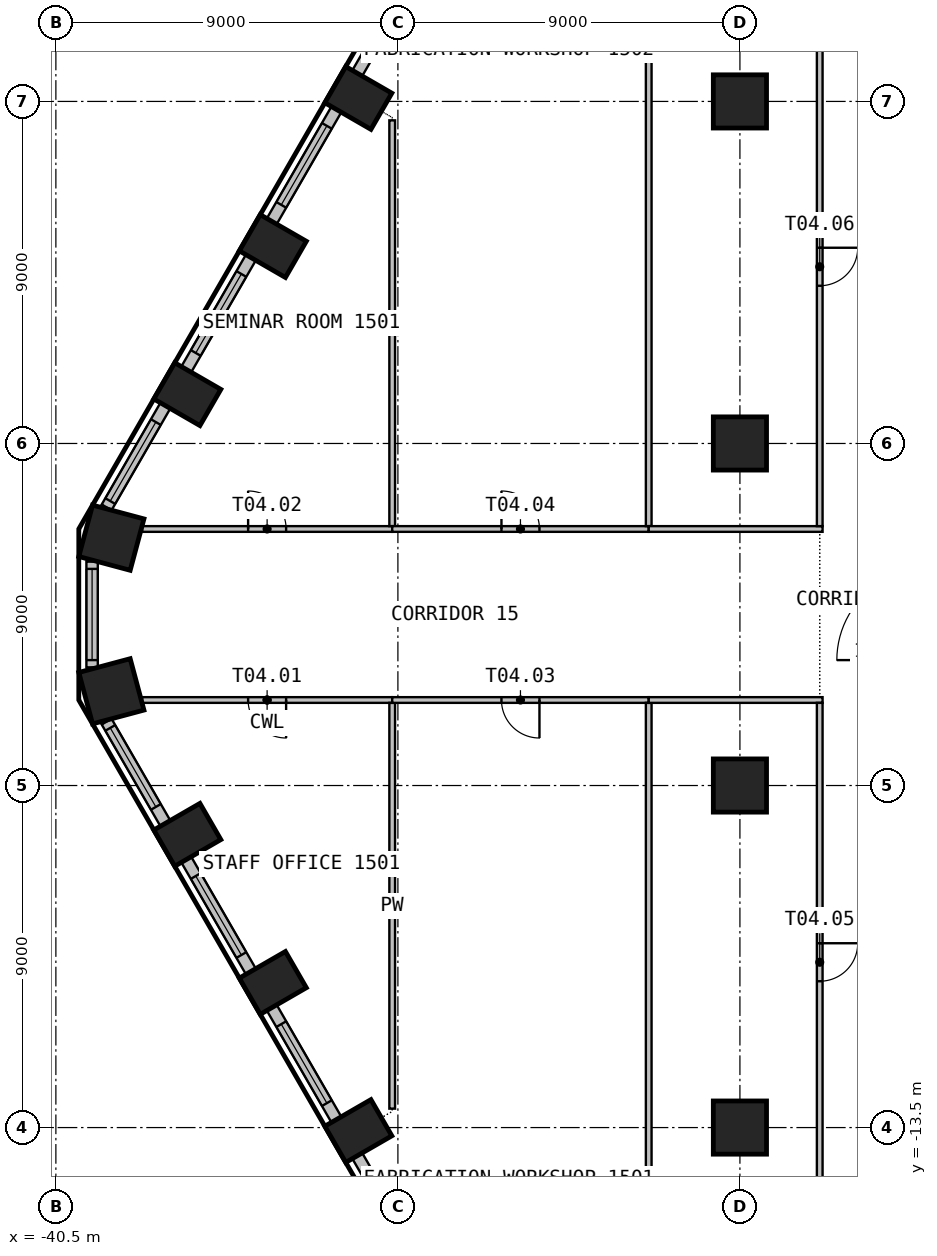
"""IFC4 building model, lengths in metres.
Left out: names, types, materials, properties, quantities, classifications, styles, units other than length and angle.
Written with IfcOpenShell. Run it as: python <this file> out.ifc"""

import sys

from ifc_helpers import new_model, si_unit, direction, frame, frame_2d, origin, origin_2d, place, context, subcontext, project, spatial, rectangle, circle, extrude, element, fill, save


model = new_model("IFC4")
c1 = context("Model", 3, precision=1e-05, world=origin(), true_north=direction((0.0, 1.0)))
c2 = subcontext(c1, "Body", "Model", "MODEL_VIEW")
j1 = project(units=[si_unit("LENGTHUNIT", "METRE"), si_unit("PLANEANGLEUNIT", "RADIAN")], contexts=[c1])
p1 = place(None, origin())
s1 = spatial("IfcSite", under=j1, at=p1, CompositionType="ELEMENT")
p2 = place(p1, origin())
s2 = spatial("IfcBuilding", under=s1, at=p2, CompositionType="ELEMENT")
p3 = place(p2, frame((0.0, 0.0, 65.1)))
s3 = spatial("IfcBuildingStorey", under=s2, at=p3, CompositionType="ELEMENT", Elevation=65.1)
for number, where, z_axis, x_axis in (
    (1, (-32.541, 13.591, 0.0), (0.0, 0.0, 1.0), (-0.5, -0.866, 0.0)),
    (2, (-34.791, 9.694, 0.0), (0.0, 0.0, 1.0), (-0.5, -0.866, 0.0)),
    (3, (-37.041, 5.797, 0.0), (0.0, 0.0, 1.0), (-0.5, -0.866, 0.0)),
):
    element("IfcColumn", number, at=place(p3, frame(where, z_axis=z_axis, x_axis=x_axis)), inside=s3, PredefinedType="COLUMN", context=c2, shape_type="SweptSolid", body=[
        extrude(rectangle(XDim=1.1, YDim=1.4, at=origin_2d()), origin(), (0.0, 0.0, 1.0), 3.525),
    ])
for number, where, z_axis, x_axis in (
    (4, (-39.04, 2.02, 0.0), (0.0, 0.0, 1.0), (-0.259, -0.966, 0.0)),
    (5, (-39.04, -2.02, 0.0), (0.0, 0.0, 1.0), (0.259, -0.966, 0.0)),
):
    element("IfcColumn", number, at=place(p3, frame(where, z_axis=z_axis, x_axis=x_axis)), inside=s3, PredefinedType="COLUMN", context=c2, shape_type="SweptSolid", body=[
        extrude(rectangle(XDim=1.4, YDim=1.4, at=origin_2d()), origin(), (0.0, 0.0, 1.0), 3.525),
    ])
for number, where, z_axis, x_axis in (
    (6, (-37.041, -5.797, 0.0), (0.0, 0.0, 1.0), (0.5, -0.866, 0.0)),
    (7, (-34.791, -9.694, 0.0), (0.0, 0.0, 1.0), (0.5, -0.866, 0.0)),
    (8, (-32.541, -13.591, 0.0), (0.0, 0.0, 1.0), (0.5, -0.866, 0.0)),
):
    element("IfcColumn", number, at=place(p3, frame(where, z_axis=z_axis, x_axis=x_axis)), inside=s3, PredefinedType="COLUMN", context=c2, shape_type="SweptSolid", body=[
        extrude(rectangle(XDim=1.1, YDim=1.4, at=origin_2d()), origin(), (0.0, 0.0, 1.0), 3.525),
    ])
for number, where, z_axis, x_axis in (
    (9, (-22.5, -13.5, 0.0), (0.0, 0.0, 1.0), (1.0, 0.0, 0.0)),
    (10, (-22.5, -4.5, 0.0), (0.0, 0.0, 1.0), (1.0, 0.0, 0.0)),
    (11, (-22.5, 4.5, 0.0), (0.0, 0.0, 1.0), (1.0, 0.0, 0.0)),
    (12, (-22.5, 13.5, 0.0), (0.0, 0.0, 1.0), (1.0, 0.0, 0.0)),
):
    element("IfcColumn", number, at=place(p3, frame(where, z_axis=z_axis, x_axis=x_axis)), inside=s3, PredefinedType="COLUMN", context=c2, shape_type="SweptSolid", body=[
        extrude(circle(Radius=0.7, at=origin_2d()), origin(), (0.0, 0.0, 1.0), 3.525),
    ])
p4 = place(p3, frame((-30.869, 17.187, 0.0), z_axis=(0.0, 0.0, 1.0), x_axis=(-0.499993955907, -0.866028893315, 0.0)))
e13 = element("IfcWall", 13, at=p4, inside=s3, PredefinedType="SOLIDWALL", context=c2, shape_type="SweptSolid", body=[
    extrude(rectangle(XDim=3.399, YDim=0.3, at=frame_2d((1.699, 0.0))), origin(), (0.0, 0.0, 1.0), 3.525),
])
p5 = place(p4, frame((0.5, 0.0, 0.9)))
e14 = element("IfcOpeningElement", 14, at=p5, cuts=e13, PredefinedType="OPENING", context=c2, shape_type="SweptSolid", body=[
    extrude(rectangle(XDim=2.4, YDim=2.1, at=frame_2d((1.2, 1.05))), frame((0.0, 0.16, 0.0), z_axis=(0.0, -1.0, 0.0), x_axis=(1.0, 0.0, 0.0)), (0.0, 0.0, 1.0), 0.32),
])
p6 = place(p3, frame((-33.119, 13.29, 0.0), z_axis=(0.0, 0.0, 1.0), x_axis=(-0.499993955907, -0.866028893315, 0.0)))
e15 = element("IfcWall", 15, at=p6, inside=s3, PredefinedType="SOLIDWALL", context=c2, shape_type="SweptSolid", body=[
    extrude(rectangle(XDim=3.399, YDim=0.3, at=frame_2d((1.699, 0.0))), origin(), (0.0, 0.0, 1.0), 3.525),
])
p7 = place(p6, frame((0.5, 0.0, 0.9)))
e16 = element("IfcOpeningElement", 16, at=p7, cuts=e15, PredefinedType="OPENING", context=c2, shape_type="SweptSolid", body=[
    extrude(rectangle(XDim=2.4, YDim=2.1, at=frame_2d((1.2, 1.05))), frame((0.0, 0.16, 0.0), z_axis=(0.0, -1.0, 0.0), x_axis=(1.0, 0.0, 0.0)), (0.0, 0.0, 1.0), 0.32),
])
p8 = place(p3, frame((-35.369, 9.393, 0.0), z_axis=(0.0, 0.0, 1.0), x_axis=(-0.499993955907, -0.866028893315, 0.0)))
e17 = element("IfcWall", 17, at=p8, inside=s3, PredefinedType="SOLIDWALL", context=c2, shape_type="SweptSolid", body=[
    extrude(rectangle(XDim=3.399, YDim=0.3, at=frame_2d((1.699, 0.0))), origin(), (0.0, 0.0, 1.0), 3.525),
])
p9 = place(p8, frame((0.5, 0.0, 0.9)))
e18 = element("IfcOpeningElement", 18, at=p9, cuts=e17, PredefinedType="OPENING", context=c2, shape_type="SweptSolid", body=[
    extrude(rectangle(XDim=2.4, YDim=2.1, at=frame_2d((1.2, 1.05))), frame((0.0, 0.16, 0.0), z_axis=(0.0, -1.0, 0.0), x_axis=(1.0, 0.0, 0.0)), (0.0, 0.0, 1.0), 0.32),
])
p10 = place(p3, frame((-37.619, 5.495, 0.0), z_axis=(0.0, 0.0, 1.0), x_axis=(-0.49997090907, -0.866042198789, 0.0)))
e19 = element("IfcWall", 19, at=p10, inside=s3, PredefinedType="SOLIDWALL", context=c2, shape_type="SweptSolid", body=[
    extrude(rectangle(XDim=3.091, YDim=0.3, at=frame_2d((1.545, 0.0))), origin(), (0.0, 0.0, 1.0), 3.525),
])
p11 = place(p10, frame((0.5, 0.0, 0.9)))
e20 = element("IfcOpeningElement", 20, at=p11, cuts=e19, PredefinedType="OPENING", context=c2, shape_type="SweptSolid", body=[
    extrude(rectangle(XDim=2.4, YDim=2.1, at=frame_2d((1.2, 1.05))), frame((0.0, 0.16, 0.0), z_axis=(0.0, -1.0, 0.0), x_axis=(1.0, 0.0, 0.0)), (0.0, 0.0, 1.0), 0.32),
])
p12 = place(p3, frame((-39.547, 1.391, 0.0), z_axis=(0.0, 0.0, 1.0), x_axis=(0.0, -1.0, 0.0)))
e21 = element("IfcWall", 21, at=p12, inside=s3, PredefinedType="SOLIDWALL", context=c2, shape_type="SweptSolid", body=[
    extrude(rectangle(XDim=2.782, YDim=0.3, at=frame_2d((1.391, 0.0))), origin(), (0.0, 0.0, 1.0), 3.525),
])
p13 = place(p12, frame((0.191, 0.0, 0.9)))
e22 = element("IfcOpeningElement", 22, at=p13, cuts=e21, PredefinedType="OPENING", context=c2, shape_type="SweptSolid", body=[
    extrude(rectangle(XDim=2.4, YDim=2.1, at=frame_2d((1.2, 1.05))), frame((0.0, 0.16, 0.0), z_axis=(0.0, -1.0, 0.0), x_axis=(1.0, 0.0, 0.0)), (0.0, 0.0, 1.0), 0.32),
])
p14 = place(p3, frame((-39.165, -2.819, 0.0), z_axis=(0.0, 0.0, 1.0), x_axis=(0.49997090907, -0.866042198789, 0.0)))
e23 = element("IfcWall", 23, at=p14, inside=s3, PredefinedType="SOLIDWALL", context=c2, shape_type="SweptSolid", body=[
    extrude(rectangle(XDim=3.091, YDim=0.3, at=frame_2d((1.545, 0.0))), origin(), (0.0, 0.0, 1.0), 3.525),
])
p15 = place(p14, frame((0.191, 0.0, 0.9)))
e24 = element("IfcOpeningElement", 24, at=p15, cuts=e23, PredefinedType="OPENING", context=c2, shape_type="SweptSolid", body=[
    extrude(rectangle(XDim=2.4, YDim=2.1, at=frame_2d((1.2, 1.05))), frame((0.0, 0.16, 0.0), z_axis=(0.0, -1.0, 0.0), x_axis=(1.0, 0.0, 0.0)), (0.0, 0.0, 1.0), 0.32),
])
p16 = place(p3, frame((-37.069, -6.449, 0.0), z_axis=(0.0, 0.0, 1.0), x_axis=(0.499993955907, -0.866028893315, 0.0)))
e25 = element("IfcWall", 25, at=p16, inside=s3, PredefinedType="SOLIDWALL", context=c2, shape_type="SweptSolid", body=[
    extrude(rectangle(XDim=3.399, YDim=0.3, at=frame_2d((1.699, 0.0))), origin(), (0.0, 0.0, 1.0), 3.525),
])
p17 = place(p16, frame((0.5, 0.0, 0.9)))
e26 = element("IfcOpeningElement", 26, at=p17, cuts=e25, PredefinedType="OPENING", context=c2, shape_type="SweptSolid", body=[
    extrude(rectangle(XDim=2.4, YDim=2.1, at=frame_2d((1.2, 1.05))), frame((0.0, 0.16, 0.0), z_axis=(0.0, -1.0, 0.0), x_axis=(1.0, 0.0, 0.0)), (0.0, 0.0, 1.0), 0.32),
])
p18 = place(p3, frame((-34.819, -10.346, 0.0), z_axis=(0.0, 0.0, 1.0), x_axis=(0.499993955907, -0.866028893315, 0.0)))
e27 = element("IfcWall", 27, at=p18, inside=s3, PredefinedType="SOLIDWALL", context=c2, shape_type="SweptSolid", body=[
    extrude(rectangle(XDim=3.399, YDim=0.3, at=frame_2d((1.699, 0.0))), origin(), (0.0, 0.0, 1.0), 3.525),
])
p19 = place(p18, frame((0.5, 0.0, 0.9)))
e28 = element("IfcOpeningElement", 28, at=p19, cuts=e27, PredefinedType="OPENING", context=c2, shape_type="SweptSolid", body=[
    extrude(rectangle(XDim=2.4, YDim=2.1, at=frame_2d((1.2, 1.05))), frame((0.0, 0.16, 0.0), z_axis=(0.0, -1.0, 0.0), x_axis=(1.0, 0.0, 0.0)), (0.0, 0.0, 1.0), 0.32),
])
p20 = place(p3, frame((-32.569, -14.243, 0.0), z_axis=(0.0, 0.0, 1.0), x_axis=(0.499993955907, -0.866028893315, 0.0)))
e29 = element("IfcWall", 29, at=p20, inside=s3, PredefinedType="SOLIDWALL", context=c2, shape_type="SweptSolid", body=[
    extrude(rectangle(XDim=3.399, YDim=0.3, at=frame_2d((1.699, 0.0))), origin(), (0.0, 0.0, 1.0), 3.525),
])
p21 = place(p20, frame((0.5, 0.0, 0.9)))
e30 = element("IfcOpeningElement", 30, at=p21, cuts=e29, PredefinedType="OPENING", context=c2, shape_type="SweptSolid", body=[
    extrude(rectangle(XDim=2.4, YDim=2.1, at=frame_2d((1.2, 1.05))), frame((0.0, 0.16, 0.0), z_axis=(0.0, -1.0, 0.0), x_axis=(1.0, 0.0, 0.0)), (0.0, 0.0, 1.0), 0.32),
])
p22 = place(p3, frame((-31.65, -2.25, 0.0), z_axis=(0.0, 0.0, 1.0), x_axis=(-1.0, 0.0, 0.0)))
e31 = element("IfcWall", 31, at=p22, inside=s3, PredefinedType="PARTITIONING", context=c2, shape_type="SweptSolid", body=[
    extrude(rectangle(XDim=6.583, YDim=0.15, at=frame_2d((3.292, 0.0))), origin(), (0.0, 0.0, 1.0), 3.525),
])
p23 = place(p22, frame((2.792, 0.0, 0.0)))
e32 = element("IfcOpeningElement", 32, at=p23, cuts=e31, PredefinedType="OPENING", context=c2, shape_type="SweptSolid", body=[
    extrude(rectangle(XDim=1.0, YDim=2.1, at=frame_2d((0.5, 1.05))), frame((0.0, 0.085, 0.0), z_axis=(0.0, -1.0, 0.0), x_axis=(1.0, 0.0, 0.0)), (0.0, 0.0, 1.0), 0.17),
])
p24 = place(p3, frame((-38.233, 2.25, 0.0), z_axis=(0.0, 0.0, 1.0), x_axis=(1.0, 0.0, 0.0)))
e33 = element("IfcWall", 33, at=p24, inside=s3, PredefinedType="PARTITIONING", context=c2, shape_type="SweptSolid", body=[
    extrude(rectangle(XDim=6.583, YDim=0.15, at=frame_2d((3.292, 0.0))), origin(), (0.0, 0.0, 1.0), 3.525),
])
p25 = place(p24, frame((2.792, 0.0, 0.0)))
e34 = element("IfcOpeningElement", 34, at=p25, cuts=e33, PredefinedType="OPENING", context=c2, shape_type="SweptSolid", body=[
    extrude(rectangle(XDim=1.0, YDim=2.1, at=frame_2d((0.5, 1.05))), frame((0.0, 0.085, 0.0), z_axis=(0.0, -1.0, 0.0), x_axis=(1.0, 0.0, 0.0)), (0.0, 0.0, 1.0), 0.17),
])
p26 = place(p3, frame((-31.65, -2.325, 0.0), z_axis=(0.0, 0.0, 1.0), x_axis=(0.0, -1.0, 0.0)))
e35 = element("IfcWall", 35, at=p26, inside=s3, PredefinedType="PARTITIONING", context=c2, shape_type="SweptSolid", body=[
    extrude(rectangle(XDim=10.677, YDim=0.15, at=frame_2d((5.338, 0.0))), origin(), (0.0, 0.0, 1.0), 3.525),
])
p27 = place(p3, frame((-24.9, -2.25, 0.0), z_axis=(0.0, 0.0, 1.0), x_axis=(-1.0, 0.0, 0.0)))
e36 = element("IfcWall", 36, at=p27, inside=s3, PredefinedType="PARTITIONING", context=c2, shape_type="SweptSolid", body=[
    extrude(rectangle(XDim=6.75, YDim=0.15, at=frame_2d((3.375, 0.0))), origin(), (0.0, 0.0, 1.0), 3.525),
])
p28 = place(p27, frame((2.875, 0.0, 0.0)))
e37 = element("IfcOpeningElement", 37, at=p28, cuts=e36, PredefinedType="OPENING", context=c2, shape_type="SweptSolid", body=[
    extrude(rectangle(XDim=1.0, YDim=2.1, at=frame_2d((0.5, 1.05))), frame((0.0, 0.085, 0.0), z_axis=(0.0, -1.0, 0.0), x_axis=(1.0, 0.0, 0.0)), (0.0, 0.0, 1.0), 0.17),
])
p29 = place(p3, frame((-31.65, 13.002, 0.0), z_axis=(0.0, 0.0, 1.0), x_axis=(0.0, -1.0, 0.0)))
e38 = element("IfcWall", 38, at=p29, inside=s3, PredefinedType="PARTITIONING", context=c2, shape_type="SweptSolid", body=[
    extrude(rectangle(XDim=10.677, YDim=0.15, at=frame_2d((5.338, 0.0))), origin(), (0.0, 0.0, 1.0), 3.525),
])
p30 = place(p3, frame((-31.65, 2.25, 0.0), z_axis=(0.0, 0.0, 1.0), x_axis=(1.0, 0.0, 0.0)))
e39 = element("IfcWall", 39, at=p30, inside=s3, PredefinedType="PARTITIONING", context=c2, shape_type="SweptSolid", body=[
    extrude(rectangle(XDim=6.75, YDim=0.15, at=frame_2d((3.375, 0.0))), origin(), (0.0, 0.0, 1.0), 3.525),
])
p31 = place(p30, frame((2.875, 0.0, 0.0)))
e40 = element("IfcOpeningElement", 40, at=p31, cuts=e39, PredefinedType="OPENING", context=c2, shape_type="SweptSolid", body=[
    extrude(rectangle(XDim=1.0, YDim=2.1, at=frame_2d((0.5, 1.05))), frame((0.0, 0.085, 0.0), z_axis=(0.0, -1.0, 0.0), x_axis=(1.0, 0.0, 0.0)), (0.0, 0.0, 1.0), 0.17),
])
p32 = place(p3, frame((-24.9, -2.325, 0.0), z_axis=(0.0, 0.0, 1.0), x_axis=(0.0, -1.0, 0.0)))
e41 = element("IfcWall", 41, at=p32, inside=s3, PredefinedType="PARTITIONING", context=c2, shape_type="SweptSolid", body=[
    extrude(rectangle(XDim=22.368, YDim=0.15, at=frame_2d((11.184, 0.0))), origin(), (0.0, 0.0, 1.0), 3.525),
])
p33 = place(p3, frame((-20.325, -2.25, 0.0), z_axis=(0.0, 0.0, 1.0), x_axis=(-1.0, 0.0, 0.0)))
e42 = element("IfcWall", 42, at=p33, inside=s3, PredefinedType="PARTITIONING", context=c2, shape_type="SweptSolid", body=[
    extrude(rectangle(XDim=4.575, YDim=0.15, at=frame_2d((2.288, 0.0))), origin(), (0.0, 0.0, 1.0), 3.525),
])
p34 = place(p3, frame((-24.9, 24.693, 0.0), z_axis=(0.0, 0.0, 1.0), x_axis=(0.0, -1.0, 0.0)))
e43 = element("IfcWall", 43, at=p34, inside=s3, PredefinedType="PARTITIONING", context=c2, shape_type="SweptSolid", body=[
    extrude(rectangle(XDim=22.368, YDim=0.15, at=frame_2d((11.184, 0.0))), origin(), (0.0, 0.0, 1.0), 3.525),
])
p35 = place(p3, frame((-24.9, 2.25, 0.0), z_axis=(0.0, 0.0, 1.0), x_axis=(1.0, 0.0, 0.0)))
e44 = element("IfcWall", 44, at=p35, inside=s3, PredefinedType="PARTITIONING", context=c2, shape_type="SweptSolid", body=[
    extrude(rectangle(XDim=4.575, YDim=0.15, at=frame_2d((2.288, 0.0))), origin(), (0.0, 0.0, 1.0), 3.525),
])
p36 = place(p3, frame((-20.4, -2.325, 0.0), z_axis=(0.0, 0.0, 1.0), x_axis=(0.0, -1.0, 0.0)))
e45 = element("IfcWall", 45, at=p36, inside=s3, PredefinedType="PARTITIONING", context=c2, shape_type="SweptSolid", body=[
    extrude(rectangle(XDim=13.65, YDim=0.15, at=frame_2d((6.825, 0.0))), origin(), (0.0, 0.0, 1.0), 3.525),
])
p37 = place(p36, frame((6.325, 0.0, 0.0)))
e46 = element("IfcOpeningElement", 46, at=p37, cuts=e45, PredefinedType="OPENING", context=c2, shape_type="SweptSolid", body=[
    extrude(rectangle(XDim=1.0, YDim=2.1, at=frame_2d((0.5, 1.05))), frame((0.0, 0.085, 0.0), z_axis=(0.0, -1.0, 0.0), x_axis=(1.0, 0.0, 0.0)), (0.0, 0.0, 1.0), 0.17),
])
p38 = place(p3, frame((-20.4, 15.975, 0.0), z_axis=(0.0, 0.0, 1.0), x_axis=(0.0, -1.0, 0.0)))
e47 = element("IfcWall", 47, at=p38, inside=s3, PredefinedType="PARTITIONING", context=c2, shape_type="SweptSolid", body=[
    extrude(rectangle(XDim=13.65, YDim=0.15, at=frame_2d((6.825, 0.0))), origin(), (0.0, 0.0, 1.0), 3.525),
])
p39 = place(p38, frame((6.325, 0.0, 0.0)))
e48 = element("IfcOpeningElement", 48, at=p39, cuts=e47, PredefinedType="OPENING", context=c2, shape_type="SweptSolid", body=[
    extrude(rectangle(XDim=1.0, YDim=2.1, at=frame_2d((0.5, 1.05))), frame((0.0, 0.085, 0.0), z_axis=(0.0, -1.0, 0.0), x_axis=(1.0, 0.0, 0.0)), (0.0, 0.0, 1.0), 0.17),
])
p40 = place(p5, origin())
e49 = element("IfcWindow", 49, at=p40, inside=s3, PartitioningType="SINGLE_PANEL", PredefinedType="WINDOW", context=c2, shape_type="SweptSolid", body=[
    extrude(rectangle(XDim=2.4, YDim=2.1, at=frame_2d((1.2, 1.05))), frame((0.0, 0.03, 0.0), z_axis=(0.0, -1.0, 0.0), x_axis=(1.0, 0.0, 0.0)), (0.0, 0.0, 1.0), 0.06),
])
fill(e14, e49)
p41 = place(p7, origin())
e50 = element("IfcWindow", 50, at=p41, inside=s3, PartitioningType="SINGLE_PANEL", PredefinedType="WINDOW", context=c2, shape_type="SweptSolid", body=[
    extrude(rectangle(XDim=2.4, YDim=2.1, at=frame_2d((1.2, 1.05))), frame((0.0, 0.03, 0.0), z_axis=(0.0, -1.0, 0.0), x_axis=(1.0, 0.0, 0.0)), (0.0, 0.0, 1.0), 0.06),
])
fill(e16, e50)
p42 = place(p9, origin())
e51 = element("IfcWindow", 51, at=p42, inside=s3, PartitioningType="SINGLE_PANEL", PredefinedType="WINDOW", context=c2, shape_type="SweptSolid", body=[
    extrude(rectangle(XDim=2.4, YDim=2.1, at=frame_2d((1.2, 1.05))), frame((0.0, 0.03, 0.0), z_axis=(0.0, -1.0, 0.0), x_axis=(1.0, 0.0, 0.0)), (0.0, 0.0, 1.0), 0.06),
])
fill(e18, e51)
p43 = place(p11, origin())
e52 = element("IfcWindow", 52, at=p43, inside=s3, PartitioningType="SINGLE_PANEL", PredefinedType="WINDOW", context=c2, shape_type="SweptSolid", body=[
    extrude(rectangle(XDim=2.4, YDim=2.1, at=frame_2d((1.2, 1.05))), frame((0.0, 0.03, 0.0), z_axis=(0.0, -1.0, 0.0), x_axis=(1.0, 0.0, 0.0)), (0.0, 0.0, 1.0), 0.06),
])
fill(e20, e52)
p44 = place(p13, origin())
e53 = element("IfcWindow", 53, at=p44, inside=s3, PartitioningType="SINGLE_PANEL", PredefinedType="WINDOW", context=c2, shape_type="SweptSolid", body=[
    extrude(rectangle(XDim=2.4, YDim=2.1, at=frame_2d((1.2, 1.05))), frame((0.0, 0.03, 0.0), z_axis=(0.0, -1.0, 0.0), x_axis=(1.0, 0.0, 0.0)), (0.0, 0.0, 1.0), 0.06),
])
fill(e22, e53)
p45 = place(p15, origin())
e54 = element("IfcWindow", 54, at=p45, inside=s3, PartitioningType="SINGLE_PANEL", PredefinedType="WINDOW", context=c2, shape_type="SweptSolid", body=[
    extrude(rectangle(XDim=2.4, YDim=2.1, at=frame_2d((1.2, 1.05))), frame((0.0, 0.03, 0.0), z_axis=(0.0, -1.0, 0.0), x_axis=(1.0, 0.0, 0.0)), (0.0, 0.0, 1.0), 0.06),
])
fill(e24, e54)
p46 = place(p17, origin())
e55 = element("IfcWindow", 55, at=p46, inside=s3, PartitioningType="SINGLE_PANEL", PredefinedType="WINDOW", context=c2, shape_type="SweptSolid", body=[
    extrude(rectangle(XDim=2.4, YDim=2.1, at=frame_2d((1.2, 1.05))), frame((0.0, 0.03, 0.0), z_axis=(0.0, -1.0, 0.0), x_axis=(1.0, 0.0, 0.0)), (0.0, 0.0, 1.0), 0.06),
])
fill(e26, e55)
p47 = place(p19, origin())
e56 = element("IfcWindow", 56, at=p47, inside=s3, PartitioningType="SINGLE_PANEL", PredefinedType="WINDOW", context=c2, shape_type="SweptSolid", body=[
    extrude(rectangle(XDim=2.4, YDim=2.1, at=frame_2d((1.2, 1.05))), frame((0.0, 0.03, 0.0), z_axis=(0.0, -1.0, 0.0), x_axis=(1.0, 0.0, 0.0)), (0.0, 0.0, 1.0), 0.06),
])
fill(e28, e56)
p48 = place(p21, origin())
e57 = element("IfcWindow", 57, at=p48, inside=s3, PartitioningType="SINGLE_PANEL", PredefinedType="WINDOW", context=c2, shape_type="SweptSolid", body=[
    extrude(rectangle(XDim=2.4, YDim=2.1, at=frame_2d((1.2, 1.05))), frame((0.0, 0.03, 0.0), z_axis=(0.0, -1.0, 0.0), x_axis=(1.0, 0.0, 0.0)), (0.0, 0.0, 1.0), 0.06),
])
fill(e30, e57)
p49 = place(p23, origin())
e58 = element("IfcDoor", 58, at=p49, inside=s3, OperationType="SINGLE_SWING_LEFT", PredefinedType="DOOR", context=c2, shape_type="SweptSolid", body=[
    extrude(rectangle(XDim=1.0, YDim=2.1, at=frame_2d((0.5, 1.05))), frame((0.0, 0.025, 0.0), z_axis=(0.0, -1.0, 0.0), x_axis=(1.0, 0.0, 0.0)), (0.0, 0.0, 1.0), 0.05),
])
fill(e32, e58)
p50 = place(p25, origin())
e59 = element("IfcDoor", 59, at=p50, inside=s3, OperationType="SINGLE_SWING_RIGHT", PredefinedType="DOOR", context=c2, shape_type="SweptSolid", body=[
    extrude(rectangle(XDim=1.0, YDim=2.1, at=frame_2d((0.5, 1.05))), frame((0.0, 0.025, 0.0), z_axis=(0.0, -1.0, 0.0), x_axis=(1.0, 0.0, 0.0)), (0.0, 0.0, 1.0), 0.05),
])
fill(e34, e59)
p51 = place(p28, origin())
e60 = element("IfcDoor", 60, at=p51, inside=s3, OperationType="SINGLE_SWING_LEFT", PredefinedType="DOOR", context=c2, shape_type="SweptSolid", body=[
    extrude(rectangle(XDim=1.0, YDim=2.1, at=frame_2d((0.5, 1.05))), frame((0.0, 0.025, 0.0), z_axis=(0.0, -1.0, 0.0), x_axis=(1.0, 0.0, 0.0)), (0.0, 0.0, 1.0), 0.05),
])
fill(e37, e60)
p52 = place(p31, origin())
e61 = element("IfcDoor", 61, at=p52, inside=s3, OperationType="SINGLE_SWING_RIGHT", PredefinedType="DOOR", context=c2, shape_type="SweptSolid", body=[
    extrude(rectangle(XDim=1.0, YDim=2.1, at=frame_2d((0.5, 1.05))), frame((0.0, 0.025, 0.0), z_axis=(0.0, -1.0, 0.0), x_axis=(1.0, 0.0, 0.0)), (0.0, 0.0, 1.0), 0.05),
])
fill(e40, e61)
p53 = place(p37, origin())
e62 = element("IfcDoor", 62, at=p53, inside=s3, OperationType="SINGLE_SWING_RIGHT", PredefinedType="DOOR", context=c2, shape_type="SweptSolid", body=[
    extrude(rectangle(XDim=1.0, YDim=2.1, at=frame_2d((0.5, 1.05))), frame((0.0, 0.025, 0.0), z_axis=(0.0, -1.0, 0.0), x_axis=(1.0, 0.0, 0.0)), (0.0, 0.0, 1.0), 0.05),
])
fill(e46, e62)
p54 = place(p39, origin())
e63 = element("IfcDoor", 63, at=p54, inside=s3, OperationType="SINGLE_SWING_LEFT", PredefinedType="DOOR", context=c2, shape_type="SweptSolid", body=[
    extrude(rectangle(XDim=1.0, YDim=2.1, at=frame_2d((0.5, 1.05))), frame((0.0, 0.025, 0.0), z_axis=(0.0, -1.0, 0.0), x_axis=(1.0, 0.0, 0.0)), (0.0, 0.0, 1.0), 0.05),
])
fill(e48, e63)
save(model, sys.argv[1])
